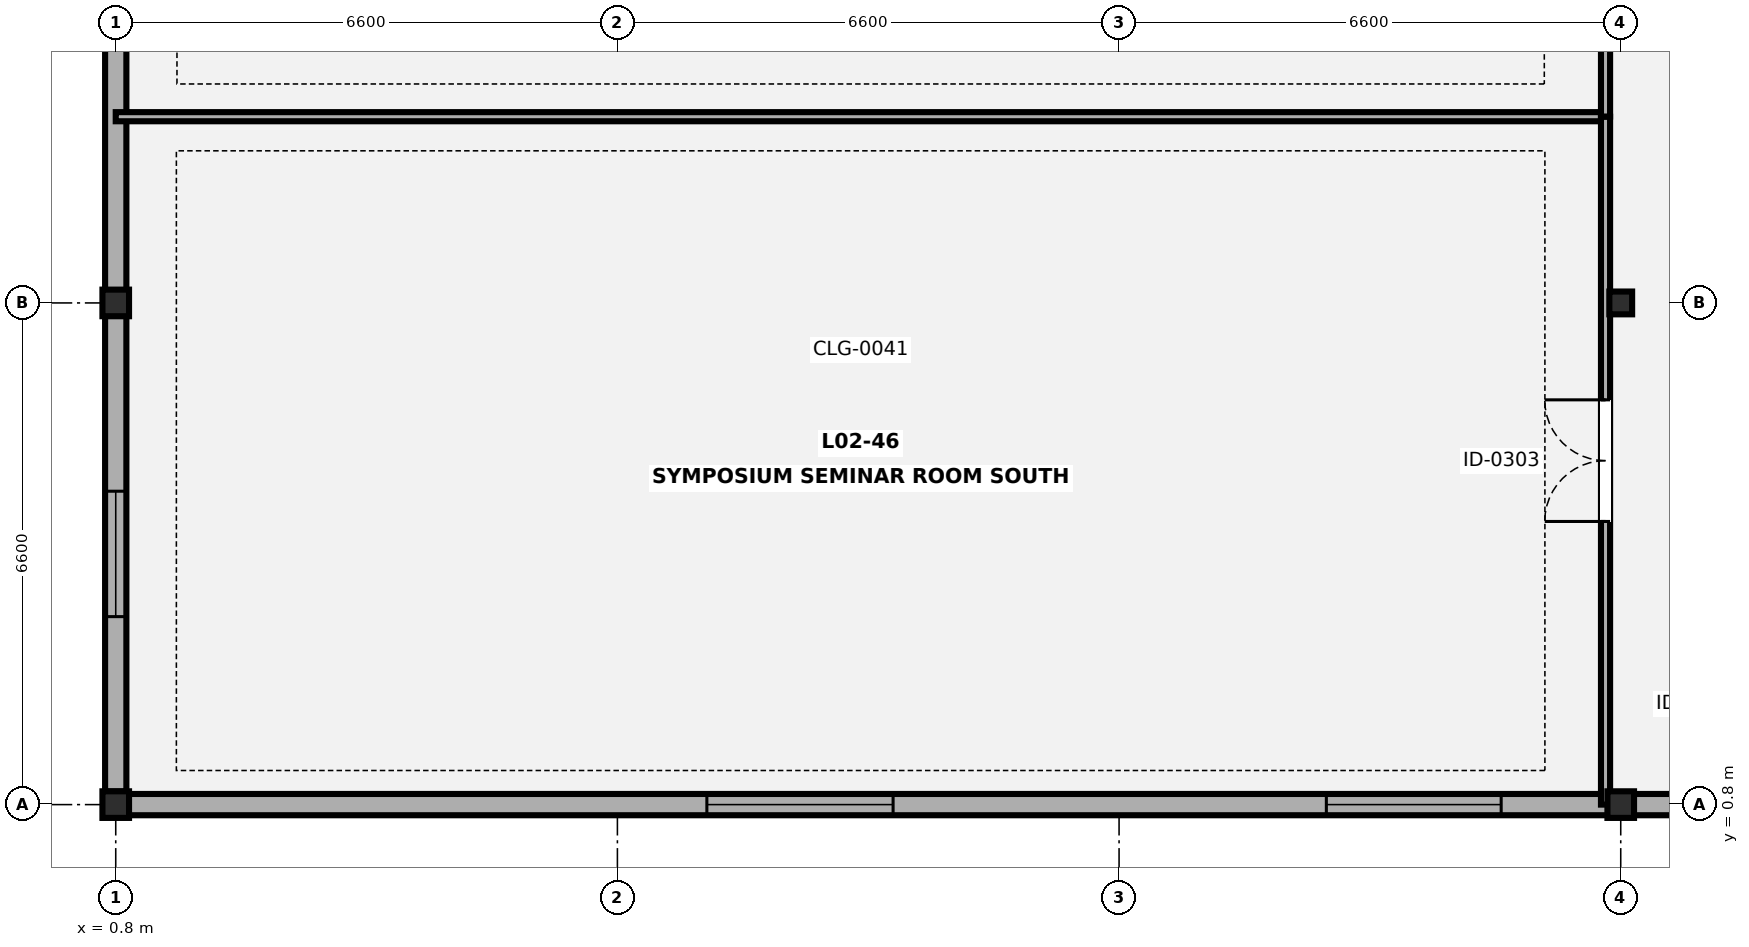
"""IFC4 building model, lengths in metres.
Left out: names, types, materials, properties, quantities, classifications, styles, units other than length and angle.
Written with IfcOpenShell. Run it as: python <this file> out.ifc"""

import sys

from ifc_helpers import new_model, si_unit, direction, frame, frame_2d, origin, origin_2d, place, context, subcontext, project, spatial, rectangle, hollow_rectangle, i_section, extrude, element, fill, save


model = new_model("IFC4")
c1 = context("Model", 3, precision=1e-05, world=origin(), true_north=direction((0.0, 1.0)))
c2 = subcontext(c1, "Body", "Model", "MODEL_VIEW")
j1 = project(units=[si_unit("LENGTHUNIT", "METRE"), si_unit("PLANEANGLEUNIT", "RADIAN")], contexts=[c1])
p1 = place(None, origin())
s1 = spatial("IfcSite", under=j1, at=p1, CompositionType="ELEMENT")
p2 = place(p1, origin())
s2 = spatial("IfcBuilding", under=s1, at=p2, CompositionType="ELEMENT")
p3 = place(p2, frame((0.0, 0.0, 9.1)))
s3 = spatial("IfcBuildingStorey", under=s2, at=p3, CompositionType="ELEMENT", Elevation=9.1)
for number, where, z_axis, x_axis in (
    (1, (0.8, 0.8, 0.0), (0.0, 0.0, 1.0), (1.0, 0.0, 0.0)),
    (2, (0.8, 7.4, 0.0), (0.0, 0.0, 1.0), (1.0, 0.0, 0.0)),
    (3, (20.6, 0.8, 0.0), (0.0, 0.0, 1.0), (1.0, 0.0, 0.0)),
):
    element("IfcColumn", number, at=place(p3, frame(where, z_axis=z_axis, x_axis=x_axis)), inside=s3, PredefinedType="COLUMN", context=c2, shape_type="SweptSolid", body=[
        extrude(i_section(OverallWidth=0.35, OverallDepth=0.35, WebThickness=0.02, FlangeThickness=0.032, FilletRadius=0.016, at=origin_2d()), origin(), (0.0, 0.0, 1.0), 3.95),
    ])
p4 = place(p3, frame((20.6, 7.4, 0.0), z_axis=(0.0, 0.0, 1.0), x_axis=(1.0, 0.0, 0.0)))
e4 = element("IfcColumn", 4, at=p4, inside=s3, PredefinedType="COLUMN", context=c2, shape_type="SweptSolid", body=[
    extrude(hollow_rectangle(XDim=0.3, YDim=0.3, WallThickness=0.012, at=origin_2d()), origin(), (0.0, 0.0, 1.0), 3.95),
])
p5 = place(p3, frame((0.8, 0.973, 0.0), z_axis=(0.0, 0.0, 1.0), x_axis=(0.0, 1.0, 0.0)))
e5 = element("IfcWall", 5, at=p5, inside=s3, PredefinedType="SOLIDWALL", context=c2, shape_type="SweptSolid", body=[
    extrude(rectangle(XDim=26.054, YDim=0.28, at=frame_2d((13.027, 0.0))), origin(), (0.0, 0.0, 1.0), 3.445),
])
p6 = place(p5, frame((2.3, 0.0, 0.85)))
e6 = element("IfcOpeningElement", 6, at=p6, cuts=e5, PredefinedType="OPENING", context=c2, shape_type="SweptSolid", body=[
    extrude(rectangle(XDim=1.65, YDim=1.25, at=frame_2d((0.825, 0.625))), frame((0.0, 0.15, 0.0), z_axis=(0.0, -1.0, 0.0), x_axis=(1.0, 0.0, 0.0)), (0.0, 0.0, 1.0), 0.3),
])
p7 = place(p5, frame((15.4, 0.0, 0.85)))
e7 = element("IfcOpeningElement", 7, at=p7, cuts=e5, PredefinedType="OPENING", context=c2, shape_type="SweptSolid", body=[
    extrude(rectangle(XDim=0.9, YDim=1.35, at=frame_2d((0.45, 0.675))), frame((0.0, 0.15, 0.0), z_axis=(0.0, -1.0, 0.0), x_axis=(1.0, 0.0, 0.0)), (0.0, 0.0, 1.0), 0.3),
])
p8 = place(p3, frame((27.027, 0.8, 0.0), z_axis=(0.0, 0.0, 1.0), x_axis=(-1.0, 0.0, 0.0)))
e8 = element("IfcWall", 8, at=p8, inside=s3, PredefinedType="SOLIDWALL", context=c2, shape_type="SweptSolid", body=[
    extrude(rectangle(XDim=26.054, YDim=0.28, at=frame_2d((13.027, 0.0))), origin(), (0.0, 0.0, 1.0), 3.505),
])
p9 = place(p8, frame((8.0, 0.0, 0.85)))
e9 = element("IfcOpeningElement", 9, at=p9, cuts=e8, PredefinedType="OPENING", context=c2, shape_type="SweptSolid", body=[
    extrude(rectangle(XDim=2.3, YDim=1.4, at=frame_2d((1.15, 0.7))), frame((0.0, 0.15, 0.0), z_axis=(0.0, -1.0, 0.0), x_axis=(1.0, 0.0, 0.0)), (0.0, 0.0, 1.0), 0.3),
])
p10 = place(p8, frame((16.0, 0.0, 0.85)))
e10 = element("IfcOpeningElement", 10, at=p10, cuts=e8, PredefinedType="OPENING", context=c2, shape_type="SweptSolid", body=[
    extrude(rectangle(XDim=2.45, YDim=1.4, at=frame_2d((1.225, 0.7))), frame((0.0, 0.15, 0.0), z_axis=(0.0, -1.0, 0.0), x_axis=(1.0, 0.0, 0.0)), (0.0, 0.0, 1.0), 0.3),
])
p11 = place(p3, frame((0.8, 9.85, 0.0), z_axis=(0.0, 0.0, 1.0), x_axis=(1.0, 0.0, 0.0)))
e11 = element("IfcWall", 11, at=p11, inside=s3, PredefinedType="PARTITIONING", context=c2, shape_type="SweptSolid", body=[
    extrude(rectangle(XDim=19.6, YDim=0.12, at=frame_2d((9.8, 0.0))), origin(), (0.0, 0.0, 1.0), 3.98),
])
p12 = place(p3, frame((20.4, 0.8, 0.0), z_axis=(0.0, 0.0, 1.0), x_axis=(0.0, 1.0, 0.0)))
e12 = element("IfcWall", 12, at=p12, inside=s3, PredefinedType="PARTITIONING", context=c2, shape_type="SweptSolid", body=[
    extrude(rectangle(XDim=9.05, YDim=0.12, at=frame_2d((4.525, 0.0))), origin(), (0.0, 0.0, 1.0), 3.445),
])
p13 = place(p12, frame((3.725, 0.0, 0.0)))
e13 = element("IfcOpeningElement", 13, at=p13, cuts=e12, PredefinedType="OPENING", context=c2, shape_type="SweptSolid", body=[
    extrude(rectangle(XDim=1.6, YDim=2.18, at=frame_2d((0.8, 1.09))), frame((0.0, 0.07, 0.0), z_axis=(0.0, -1.0, 0.0), x_axis=(1.0, 0.0, 0.0)), (0.0, 0.0, 1.0), 0.14),
])
p14 = place(p3, frame((20.4, 9.852, 0.0), z_axis=(0.0, 0.0, 1.0), x_axis=(0.0, 1.0, 0.0)))
e14 = element("IfcWall", 14, at=p14, inside=s3, PredefinedType="PARTITIONING", context=c2, shape_type="SweptSolid", body=[
    extrude(rectangle(XDim=8.398, YDim=0.12, at=frame_2d((4.199, 0.0))), origin(), (0.0, 0.0, 1.0), 3.445),
])
p15 = place(p14, frame((5.324, 0.0, 0.0)))
e15 = element("IfcOpeningElement", 15, at=p15, cuts=e14, PredefinedType="OPENING", context=c2, shape_type="SweptSolid", body=[
    extrude(rectangle(XDim=0.95, YDim=2.1, at=frame_2d((0.475, 1.05))), frame((0.0, 0.07, 0.0), z_axis=(0.0, -1.0, 0.0), x_axis=(1.0, 0.0, 0.0)), (0.0, 0.0, 1.0), 0.14),
])
p16 = place(p6, origin())
e16 = element("IfcWindow", 16, at=p16, inside=s3, PartitioningType="SINGLE_PANEL", PredefinedType="WINDOW", context=c2, shape_type="SweptSolid", body=[
    extrude(rectangle(XDim=1.65, YDim=1.25, at=frame_2d((0.825, 0.625))), frame((0.0, 0.03, 0.0), z_axis=(0.0, -1.0, 0.0), x_axis=(1.0, 0.0, 0.0)), (0.0, 0.0, 1.0), 0.06),
])
fill(e6, e16)
p17 = place(p9, origin())
e17 = element("IfcWindow", 17, at=p17, inside=s3, PartitioningType="SINGLE_PANEL", PredefinedType="WINDOW", context=c2, shape_type="SweptSolid", body=[
    extrude(rectangle(XDim=2.3, YDim=1.4, at=frame_2d((1.15, 0.7))), frame((0.0, 0.03, 0.0), z_axis=(0.0, -1.0, 0.0), x_axis=(1.0, 0.0, 0.0)), (0.0, 0.0, 1.0), 0.06),
])
fill(e9, e17)
p18 = place(p10, origin())
e18 = element("IfcWindow", 18, at=p18, inside=s3, PartitioningType="SINGLE_PANEL", PredefinedType="WINDOW", context=c2, shape_type="SweptSolid", body=[
    extrude(rectangle(XDim=2.45, YDim=1.4, at=frame_2d((1.225, 0.7))), frame((0.0, 0.03, 0.0), z_axis=(0.0, -1.0, 0.0), x_axis=(1.0, 0.0, 0.0)), (0.0, 0.0, 1.0), 0.06),
])
fill(e10, e18)
p19 = place(p13, origin())
e19 = element("IfcDoor", 19, at=p19, inside=s3, OperationType="DOUBLE_DOOR_SINGLE_SWING", PredefinedType="DOOR", context=c2, shape_type="SweptSolid", body=[
    extrude(rectangle(XDim=1.6, YDim=2.18, at=frame_2d((0.8, 1.09))), frame((0.0, 0.025, 0.0), z_axis=(0.0, -1.0, 0.0), x_axis=(1.0, 0.0, 0.0)), (0.0, 0.0, 1.0), 0.05),
])
fill(e13, e19)
save(model, sys.argv[1])
